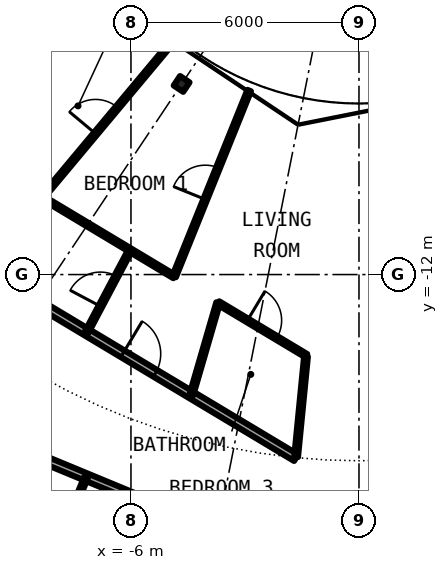
"""IFC4 building model, lengths in metres.
Left out: names, types, materials, properties, quantities, classifications, styles, units other than length and angle.
Written with IfcOpenShell. Run it as: python <this file> out.ifc"""

import sys

from ifc_helpers import new_model, si_unit, direction, frame, frame_2d, origin, origin_2d, place, context, subcontext, project, spatial, rectangle, i_section, extrude, element, fill, save


model = new_model("IFC4")
c1 = context("Model", 3, precision=1e-05, world=origin(), true_north=direction((0.0, 1.0)))
c2 = subcontext(c1, "Body", "Model", "MODEL_VIEW")
j1 = project(units=[si_unit("LENGTHUNIT", "METRE"), si_unit("PLANEANGLEUNIT", "RADIAN")], contexts=[c1])
p1 = place(None, origin())
s1 = spatial("IfcSite", under=j1, at=p1, CompositionType="ELEMENT")
p2 = place(p1, origin())
s2 = spatial("IfcBuilding", under=s1, at=p2, CompositionType="ELEMENT")
p3 = place(p2, frame((0.0, 0.0, 120.8)))
s3 = spatial("IfcBuildingStorey", under=s2, at=p3, CompositionType="ELEMENT", Elevation=120.8)
p4 = place(p3, frame((-4.667, -6.984, 0.0), z_axis=(0.0, 0.0, 1.0), x_axis=(-0.55557023302, -0.831469612303, 0.0)))
e1 = element("IfcColumn", 1, at=p4, inside=s3, PredefinedType="COLUMN", context=c2, shape_type="SweptSolid", body=[
    extrude(i_section(OverallWidth=0.3, OverallDepth=0.3, WebThickness=0.011, FlangeThickness=0.019, FilletRadius=0.027, at=origin_2d()), origin(), (0.0, 0.0, 1.0), 3.05),
])
p5 = place(p3, frame((-12.434, -15.151, 0.0), z_axis=(0.0, 0.0, 1.0), x_axis=(0.923888467236, -0.382661861319, 0.0)))
e2 = element("IfcWall", 2, at=p5, inside=s3, PredefinedType="PARTITIONING", context=c2, shape_type="SweptSolid", body=[
    extrude(rectangle(XDim=11.381, YDim=0.2, at=frame_2d((5.691, 0.0))), origin(), (0.0, 0.0, 1.0), 2.7),
])
p6 = place(p5, frame((3.292, 0.0, 0.0)))
e3 = element("IfcOpeningElement", 3, at=p6, cuts=e2, PredefinedType="OPENING", context=c2, shape_type="SweptSolid", body=[
    extrude(rectangle(XDim=1.0, YDim=2.3, at=frame_2d((0.5, 1.15))), frame((0.0, 0.11, 0.0), z_axis=(0.0, -1.0, 0.0), x_axis=(1.0, 0.0, 0.0)), (0.0, 0.0, 1.0), 0.22),
])
p7 = place(p3, frame((-14.051, -9.391, 0.0), z_axis=(0.0, 0.0, 1.0), x_axis=(0.857768591583, -0.514036033069, 0.0)))
e4 = element("IfcWall", 4, at=p7, inside=s3, PredefinedType="PARTITIONING", context=c2, shape_type="SweptSolid", body=[
    extrude(rectangle(XDim=14.45, YDim=0.2, at=frame_2d((7.225, 0.0))), origin(), (0.0, 0.0, 1.0), 2.7),
])
p8 = place(p7, frame((9.133, 0.0, 0.0)))
e5 = element("IfcOpeningElement", 5, at=p8, cuts=e4, PredefinedType="OPENING", context=c2, shape_type="SweptSolid", body=[
    extrude(rectangle(XDim=1.0, YDim=2.3, at=frame_2d((0.5, 1.15))), frame((0.0, 0.11, 0.0), z_axis=(0.0, -1.0, 0.0), x_axis=(1.0, 0.0, 0.0)), (0.0, 0.0, 1.0), 0.22),
])
p9 = place(p3, frame((-9.621, -9.199, 0.0), z_axis=(0.0, 0.0, 1.0), x_axis=(0.857698539053, -0.514152911211, 0.0)))
e6 = element("IfcWall", 6, at=p9, inside=s3, PredefinedType="PARTITIONING", context=c2, shape_type="SweptSolid", body=[
    extrude(rectangle(XDim=5.551, YDim=0.1, at=frame_2d((2.775, 0.0))), origin(), (0.0, 0.0, 1.0), 2.7),
])
p10 = place(p3, frame((-3.702, -12.747, 0.0), z_axis=(0.0, 0.0, 1.0), x_axis=(0.85772440305, -0.514109763001, 0.0)))
e7 = element("IfcWall", 7, at=p10, inside=s3, PredefinedType="PARTITIONING", context=c2, shape_type="SweptSolid", body=[
    extrude(rectangle(XDim=2.698, YDim=0.1, at=frame_2d((1.349, 0.0))), origin(), (0.0, 0.0, 1.0), 2.7),
])
p11 = place(p10, frame((0.894, 0.0, 0.0)))
e8 = element("IfcOpeningElement", 8, at=p11, cuts=e7, PredefinedType="OPENING", context=c2, shape_type="SweptSolid", body=[
    extrude(rectangle(XDim=0.9, YDim=2.3, at=frame_2d((0.45, 1.15))), frame((0.0, 0.06, 0.0), z_axis=(0.0, -1.0, 0.0), x_axis=(1.0, 0.0, 0.0)), (0.0, 0.0, 1.0), 0.12),
])
p12 = place(p3, frame((-10.399, -25.106, 0.0), z_axis=(0.0, 0.0, 1.0), x_axis=(0.382697543868, 0.923873687209, 0.0)))
e9 = element("IfcWall", 9, at=p12, inside=s3, PredefinedType="PARTITIONING", context=c2, shape_type="SweptSolid", body=[
    extrude(rectangle(XDim=8.419, YDim=0.1, at=frame_2d((4.209, 0.0))), origin(), (0.0, 0.0, 1.0), 2.7),
])
p13 = place(p12, frame((6.677, 0.0, 0.0)))
e10 = element("IfcOpeningElement", 10, at=p13, cuts=e9, PredefinedType="OPENING", context=c2, shape_type="SweptSolid", body=[
    extrude(rectangle(XDim=0.9, YDim=2.3, at=frame_2d((0.45, 1.15))), frame((0.0, 0.06, 0.0), z_axis=(0.0, -1.0, 0.0), x_axis=(1.0, 0.0, 0.0)), (0.0, 0.0, 1.0), 0.12),
])
p14 = place(p12, frame((2.468, 0.0, 0.0)))
e11 = element("IfcOpeningElement", 11, at=p14, cuts=e9, PredefinedType="OPENING", context=c2, shape_type="SweptSolid", body=[
    extrude(rectangle(XDim=0.9, YDim=2.3, at=frame_2d((0.45, 1.15))), frame((0.0, 0.06, 0.0), z_axis=(0.0, -1.0, 0.0), x_axis=(1.0, 0.0, 0.0)), (0.0, 0.0, 1.0), 0.12),
])
p15 = place(p3, frame((-8.335, -9.97, 0.0), z_axis=(0.0, 0.0, 1.0), x_axis=(0.641376424834, 0.767226356213, 0.0)))
e12 = element("IfcWall", 12, at=p15, inside=s3, PredefinedType="PARTITIONING", context=c2, shape_type="SweptSolid", body=[
    extrude(rectangle(XDim=5.275, YDim=0.1, at=frame_2d((2.637, 0.0))), origin(), (0.0, 0.0, 1.0), 2.7),
])
p16 = place(p15, frame((2.187, 0.0, 0.0)))
e13 = element("IfcOpeningElement", 13, at=p16, cuts=e12, PredefinedType="OPENING", context=c2, shape_type="SweptSolid", body=[
    extrude(rectangle(XDim=0.9, YDim=2.3, at=frame_2d((0.45, 1.15))), frame((0.0, 0.06, 0.0), z_axis=(0.0, -1.0, 0.0), x_axis=(1.0, 0.0, 0.0)), (0.0, 0.0, 1.0), 0.12),
])
p17 = place(p3, frame((-7.166, -13.517, 0.0), z_axis=(0.0, 0.0, 1.0), x_axis=(0.468337293896, 0.883549760425, 0.0)))
e14 = element("IfcWall", 14, at=p17, inside=s3, PredefinedType="PARTITIONING", context=c2, shape_type="SweptSolid", body=[
    extrude(rectangle(XDim=2.445, YDim=0.1, at=frame_2d((1.222, 0.0))), origin(), (0.0, 0.0, 1.0), 2.7),
])
p18 = place(p17, frame((0.772, 0.0, 0.0)))
e15 = element("IfcOpeningElement", 15, at=p18, cuts=e14, PredefinedType="OPENING", context=c2, shape_type="SweptSolid", body=[
    extrude(rectangle(XDim=0.9, YDim=2.3, at=frame_2d((0.45, 1.15))), frame((0.0, 0.06, 0.0), z_axis=(0.0, -1.0, 0.0), x_axis=(1.0, 0.0, 0.0)), (0.0, 0.0, 1.0), 0.12),
])
p19 = place(p3, frame((-4.864, -12.051, 0.0), z_axis=(0.0, 0.0, 1.0), x_axis=(0.374372761824, 0.927278294367, 0.0)))
e16 = element("IfcWall", 16, at=p19, inside=s3, PredefinedType="PARTITIONING", context=c2, shape_type="SweptSolid", body=[
    extrude(rectangle(XDim=5.276, YDim=0.1, at=frame_2d((2.638, 0.0))), origin(), (0.0, 0.0, 1.0), 2.7),
])
p20 = place(p19, frame((2.188, 0.0, 0.0)))
e17 = element("IfcOpeningElement", 17, at=p20, cuts=e16, PredefinedType="OPENING", context=c2, shape_type="SweptSolid", body=[
    extrude(rectangle(XDim=0.9, YDim=2.3, at=frame_2d((0.45, 1.15))), frame((0.0, 0.06, 0.0), z_axis=(0.0, -1.0, 0.0), x_axis=(1.0, 0.0, 0.0)), (0.0, 0.0, 1.0), 0.12),
])
p21 = place(p3, frame((-4.411, -15.168, 0.0), z_axis=(0.0, 0.0, 1.0), x_axis=(0.279201466266, 0.960232545395, 0.0)))
e18 = element("IfcWall", 18, at=p21, inside=s3, PredefinedType="PARTITIONING", context=c2, shape_type="SweptSolid", body=[
    extrude(rectangle(XDim=2.524, YDim=0.1, at=frame_2d((1.262, 0.0))), origin(), (0.0, 0.0, 1.0), 2.7),
])
p22 = place(p3, frame((-1.394, -14.154, 0.0), z_axis=(0.0, 0.0, 1.0), x_axis=(-0.097901702875, -0.995196089509, 0.0)))
e19 = element("IfcWall", 19, at=p22, inside=s3, PredefinedType="PARTITIONING", context=c2, shape_type="SweptSolid", body=[
    extrude(rectangle(XDim=2.656, YDim=0.1, at=frame_2d((1.328, 0.0))), origin(), (0.0, 0.0, 1.0), 2.7),
])
p23 = place(p8, origin())
e20 = element("IfcDoor", 20, at=p23, inside=s3, OperationType="SINGLE_SWING_RIGHT", PredefinedType="DOOR", context=c2, shape_type="SweptSolid", body=[
    extrude(rectangle(XDim=1.0, YDim=2.3, at=frame_2d((0.5, 1.15))), frame((0.0, 0.025, 0.0), z_axis=(0.0, -1.0, 0.0), x_axis=(1.0, 0.0, 0.0)), (0.0, 0.0, 1.0), 0.05),
])
fill(e5, e20)
p24 = place(p11, origin())
e21 = element("IfcDoor", 21, at=p24, inside=s3, OperationType="SINGLE_SWING_LEFT", PredefinedType="DOOR", context=c2, shape_type="SweptSolid", body=[
    extrude(rectangle(XDim=0.9, YDim=2.3, at=frame_2d((0.45, 1.15))), frame((0.0, 0.025, 0.0), z_axis=(0.0, -1.0, 0.0), x_axis=(1.0, 0.0, 0.0)), (0.0, 0.0, 1.0), 0.05),
])
fill(e8, e21)
p25 = place(p18, origin())
e22 = element("IfcDoor", 22, at=p25, inside=s3, OperationType="SINGLE_SWING_LEFT", PredefinedType="DOOR", context=c2, shape_type="SweptSolid", body=[
    extrude(rectangle(XDim=0.9, YDim=2.3, at=frame_2d((0.45, 1.15))), frame((0.0, 0.025, 0.0), z_axis=(0.0, -1.0, 0.0), x_axis=(1.0, 0.0, 0.0)), (0.0, 0.0, 1.0), 0.05),
])
fill(e15, e22)
p26 = place(p20, origin())
e23 = element("IfcDoor", 23, at=p26, inside=s3, OperationType="SINGLE_SWING_RIGHT", PredefinedType="DOOR", context=c2, shape_type="SweptSolid", body=[
    extrude(rectangle(XDim=0.9, YDim=2.3, at=frame_2d((0.45, 1.15))), frame((0.0, 0.025, 0.0), z_axis=(0.0, -1.0, 0.0), x_axis=(1.0, 0.0, 0.0)), (0.0, 0.0, 1.0), 0.05),
])
fill(e17, e23)
p27 = place(p16, origin())
e24 = element("IfcDoor", 24, at=p27, inside=s3, OperationType="SINGLE_SWING_RIGHT", PredefinedType="DOOR", context=c2, shape_type="SweptSolid", body=[
    extrude(rectangle(XDim=0.9, YDim=2.3, at=frame_2d((0.45, 1.15))), frame((0.0, 0.025, 0.0), z_axis=(0.0, -1.0, 0.0), x_axis=(1.0, 0.0, 0.0)), (0.0, 0.0, 1.0), 0.05),
])
fill(e13, e24)
save(model, sys.argv[1])
